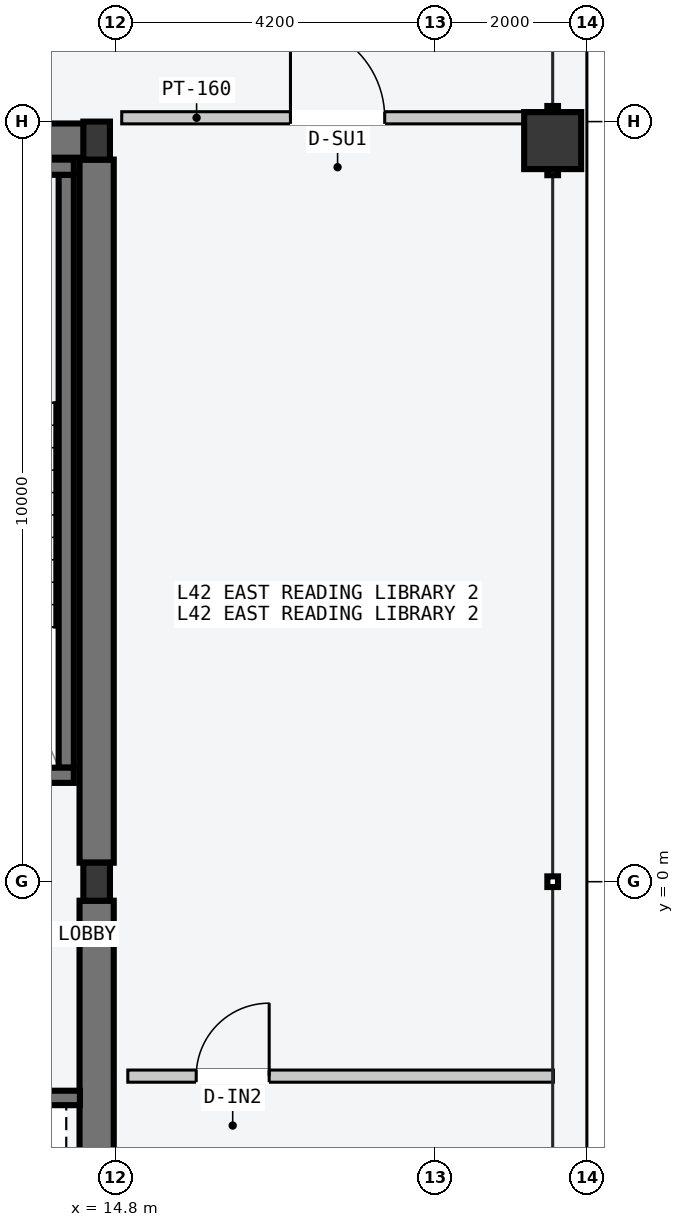
"""IFC4 building model, lengths in metres.
Left out: names, types, materials, properties, quantities, classifications, styles, units other than length and angle.
Written with IfcOpenShell. Run it as: python <this file> out.ifc"""

import sys

from ifc_helpers import new_model, si_unit, direction, frame, frame_2d, origin, origin_2d, place, context, subcontext, project, spatial, rectangle, hollow_rectangle, i_section, extrude, element, fill, save


model = new_model("IFC4")
c1 = context("Model", 3, precision=1e-05, world=origin(), true_north=direction((0.0, 1.0)))
c2 = subcontext(c1, "Body", "Model", "MODEL_VIEW")
j1 = project(units=[si_unit("LENGTHUNIT", "METRE"), si_unit("PLANEANGLEUNIT", "RADIAN")], contexts=[c1])
p1 = place(None, origin())
s1 = spatial("IfcSite", under=j1, at=p1, CompositionType="ELEMENT")
p2 = place(p1, origin())
s2 = spatial("IfcBuilding", under=s1, at=p2, CompositionType="ELEMENT")
p3 = place(p2, frame((0.0, 0.0, 162.3)))
s3 = spatial("IfcBuildingStorey", under=s2, at=p3, CompositionType="ELEMENT", Elevation=162.3)
p4 = place(p3, frame((8.07, 9.75, -0.2), z_axis=(0.0, 0.0, 1.0), x_axis=(1.0, 0.0, 0.0)))
e1 = element("IfcWall", 1, at=p4, inside=s3, PredefinedType="SHEAR", context=c2, shape_type="SweptSolid", body=[
    extrude(rectangle(XDim=6.46, YDim=0.45, at=frame_2d((3.23, 0.0))), origin(), (0.0, 0.0, 1.0), 3.6),
])
for number, where, z_axis, x_axis in (
    (2, (14.55, -9.5, -0.2), (0.0, 0.0, 1.0), (0.0, 1.0, 0.0)),
    (3, (14.55, 0.25, -0.2), (0.0, 0.0, 1.0), (0.0, 1.0, 0.0)),
):
    element("IfcWall", number, at=place(p3, frame(where, z_axis=z_axis, x_axis=x_axis)), inside=s3, PredefinedType="SHEAR", context=c2, shape_type="SweptSolid", body=[
        extrude(rectangle(XDim=9.25, YDim=0.45, at=frame_2d((4.625, 0.0))), origin(), (0.0, 0.0, 1.0), 3.6),
    ])
p5 = place(p3, frame((14.15, 1.5, -0.2), z_axis=(0.0, 0.0, 1.0), x_axis=(0.0, 1.0, 0.0)))
e4 = element("IfcWall", 4, at=p5, inside=s3, PredefinedType="SOLIDWALL", context=c2, shape_type="SweptSolid", body=[
    extrude(rectangle(XDim=7.8, YDim=0.2, at=frame_2d((3.9, 0.0))), origin(), (0.0, 0.0, 1.0), 3.6),
])
p6 = place(p3, frame((10.53, 1.4, -0.2), z_axis=(0.0, 0.0, 1.0), x_axis=(1.0, 0.0, 0.0)))
e5 = element("IfcWall", 5, at=p6, inside=s3, PredefinedType="SOLIDWALL", context=c2, shape_type="SweptSolid", body=[
    extrude(rectangle(XDim=3.72, YDim=0.2, at=frame_2d((1.86, 0.0))), origin(), (0.0, 0.0, 1.0), 3.6),
])
p7 = place(p6, frame((1.5, 0.0, 0.2)))
e6 = element("IfcOpeningElement", 6, at=p7, cuts=e5, PredefinedType="OPENING", context=c2, shape_type="SweptSolid", body=[
    extrude(rectangle(XDim=1.12, YDim=2.18, at=frame_2d((0.56, 1.09))), frame((0.0, 0.11, 0.0), z_axis=(0.0, -1.0, 0.0), x_axis=(1.0, 0.0, 0.0)), (0.0, 0.0, 1.0), 0.22),
])
p8 = place(p3, frame((10.53, 9.4, -0.2), z_axis=(0.0, 0.0, 1.0), x_axis=(1.0, 0.0, 0.0)))
e7 = element("IfcWall", 7, at=p8, inside=s3, PredefinedType="SOLIDWALL", context=c2, shape_type="SweptSolid", body=[
    extrude(rectangle(XDim=3.72, YDim=0.2, at=frame_2d((1.86, 0.0))), origin(), (0.0, 0.0, 1.0), 3.6),
])
for number, where, z_axis, x_axis in (
    (8, (14.55, 0.0, 0.0), (0.0, 0.0, 1.0), (1.0, 0.0, 0.0)),
    (9, (14.55, 9.75, 0.0), (0.0, 0.0, 1.0), (1.0, 0.0, 0.0)),
):
    element("IfcColumn", number, at=place(p3, frame(where, z_axis=z_axis, x_axis=x_axis)), inside=s3, PredefinedType="COLUMN", context=c2, shape_type="SweptSolid", body=[
        extrude(i_section(OverallWidth=0.35, OverallDepth=0.5, WebThickness=0.02, FlangeThickness=0.032, at=origin_2d()), origin(), (0.0, 0.0, 1.0), 3.6),
    ])
p9 = place(p3, frame((20.55, 9.75, 0.0), z_axis=(0.0, 0.0, 1.0), x_axis=(0.0, 1.0, 0.0)))
e10 = element("IfcColumn", 10, at=p9, inside=s3, PredefinedType="COLUMN", context=c2, shape_type="SweptSolid", body=[
    extrude(hollow_rectangle(XDim=0.75, YDim=0.75, WallThickness=0.032, at=origin_2d()), origin(), (0.0, 0.0, 1.0), 3.6),
])
p10 = place(p3, frame((11.65, -2.845, -0.2), z_axis=(0.0, 0.0, 1.0), x_axis=(1.0, 0.0, 0.0)))
e11 = element("IfcWall", 11, at=p10, inside=s3, PredefinedType="SOLIDWALL", context=c2, shape_type="SweptSolid", body=[
    extrude(rectangle(XDim=2.68, YDim=0.19, at=frame_2d((1.34, 0.0))), origin(), (0.0, 0.0, 1.0), 3.6),
])
p11 = place(p10, frame((0.65, 0.0, 0.2)))
e12 = element("IfcOpeningElement", 12, at=p11, cuts=e11, PredefinedType="OPENING", context=c2, shape_type="SweptSolid", body=[
    extrude(rectangle(XDim=1.2, YDim=2.2, at=frame_2d((0.6, 1.1))), frame((0.0, 0.105, 0.0), z_axis=(0.0, -1.0, 0.0), x_axis=(1.0, 0.0, 0.0)), (0.0, 0.0, 1.0), 0.21),
])
p12 = place(p3, frame((14.88, 10.05, 0.0), z_axis=(0.0, 0.0, 1.0), x_axis=(1.0, 0.0, 0.0)))
e13 = element("IfcWall", 13, at=p12, inside=s3, PredefinedType="PARTITIONING", context=c2, shape_type="SweptSolid", body=[
    extrude(rectangle(XDim=5.68, YDim=0.16, at=frame_2d((2.84, 0.0))), origin(), (0.0, 0.0, 1.0), 3.4),
])
p13 = place(p12, frame((2.22, 0.0, 0.0)))
e14 = element("IfcOpeningElement", 14, at=p13, cuts=e13, PredefinedType="OPENING", context=c2, shape_type="SweptSolid", body=[
    extrude(rectangle(XDim=1.24, YDim=2.24, at=frame_2d((0.62, 1.12))), frame((0.0, 0.09, 0.0), z_axis=(0.0, -1.0, 0.0), x_axis=(1.0, 0.0, 0.0)), (0.0, 0.0, 1.0), 0.18),
])
p14 = place(p3, frame((14.96, -2.558, 0.0), z_axis=(0.0, 0.0, 1.0), x_axis=(1.0, 0.0, 0.0)))
e15 = element("IfcWall", 15, at=p14, inside=s3, PredefinedType="PARTITIONING", context=c2, shape_type="SweptSolid", body=[
    extrude(rectangle(XDim=5.6, YDim=0.16, at=frame_2d((2.8, 0.0))), origin(), (0.0, 0.0, 1.0), 3.4),
])
p15 = place(p14, frame((0.9, 0.0, 0.0)))
e16 = element("IfcOpeningElement", 16, at=p15, cuts=e15, PredefinedType="OPENING", context=c2, shape_type="SweptSolid", body=[
    extrude(rectangle(XDim=0.96, YDim=2.18, at=frame_2d((0.48, 1.09))), frame((0.0, 0.09, 0.0), z_axis=(0.0, -1.0, 0.0), x_axis=(1.0, 0.0, 0.0)), (0.0, 0.0, 1.0), 0.18),
])
p16 = place(p13, origin())
e17 = element("IfcDoor", 17, at=p16, inside=s3, OperationType="SINGLE_SWING_LEFT", PredefinedType="DOOR", context=c2, shape_type="SweptSolid", body=[
    extrude(rectangle(XDim=1.24, YDim=2.24, at=frame_2d((0.62, 1.12))), frame((0.0, 0.025, 0.0), z_axis=(0.0, -1.0, 0.0), x_axis=(1.0, 0.0, 0.0)), (0.0, 0.0, 1.0), 0.05),
])
fill(e14, e17)
p17 = place(p15, origin())
e18 = element("IfcDoor", 18, at=p17, inside=s3, OperationType="SINGLE_SWING_RIGHT", PredefinedType="DOOR", context=c2, shape_type="SweptSolid", body=[
    extrude(rectangle(XDim=0.96, YDim=2.18, at=frame_2d((0.48, 1.09))), frame((0.0, 0.025, 0.0), z_axis=(0.0, -1.0, 0.0), x_axis=(1.0, 0.0, 0.0)), (0.0, 0.0, 1.0), 0.05),
])
fill(e16, e18)
save(model, sys.argv[1])
